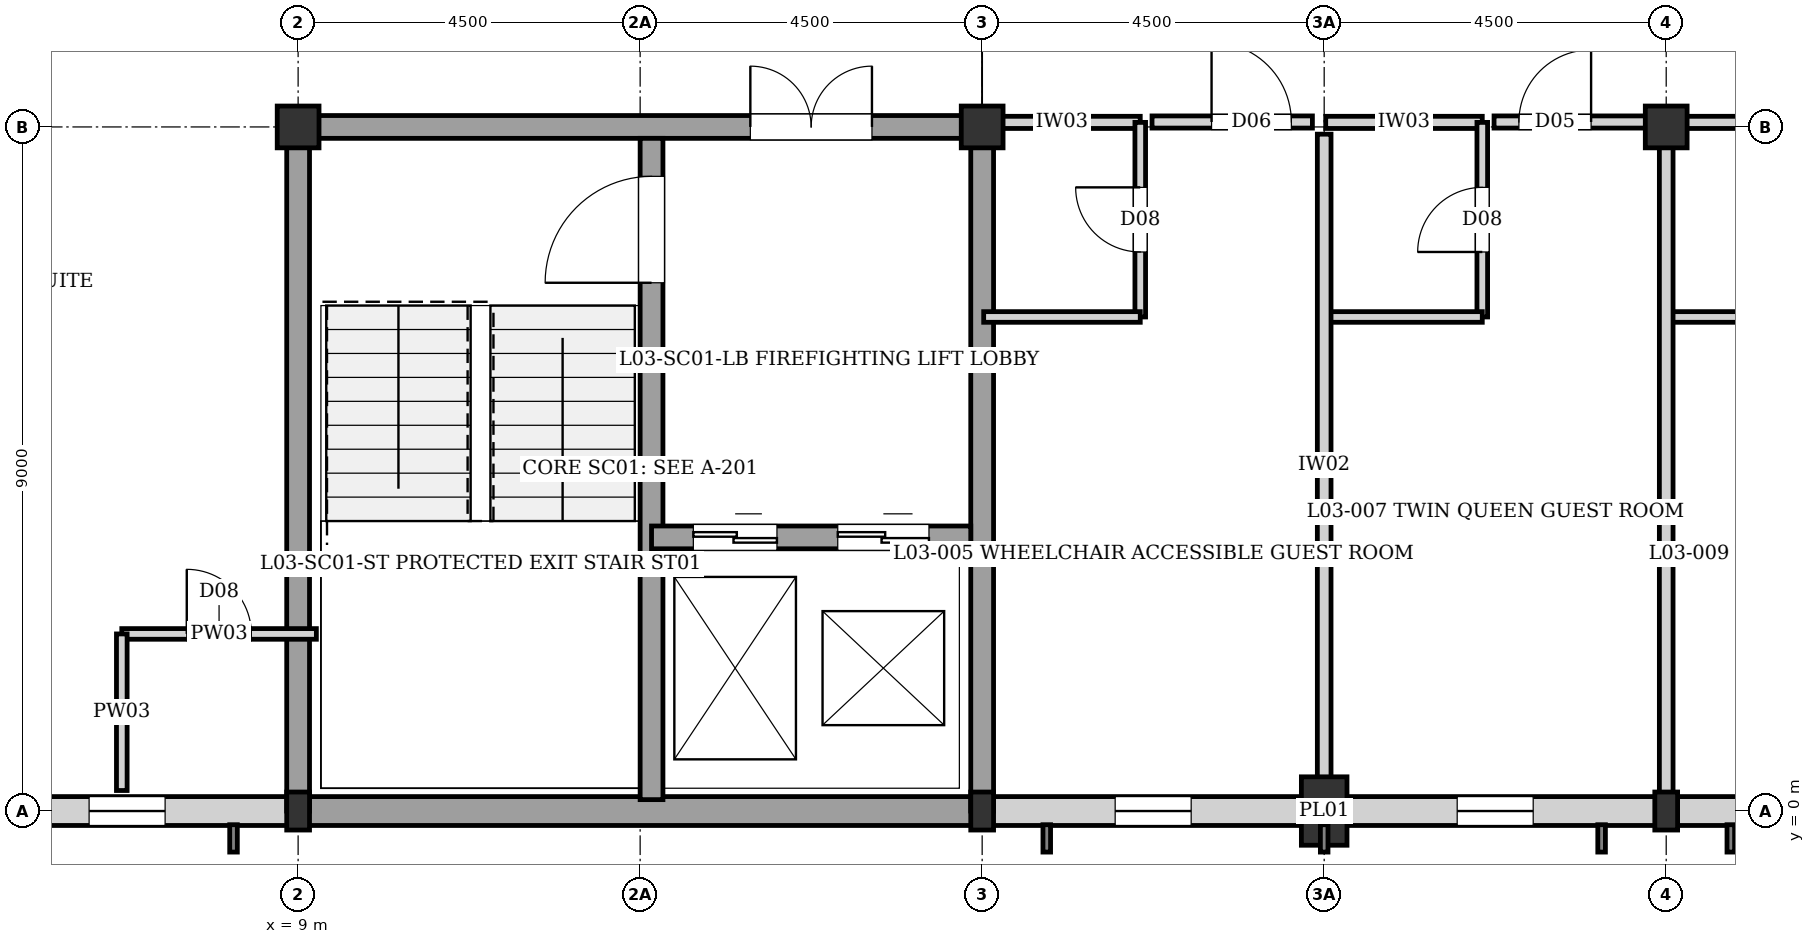
"""IFC4 building model, lengths in metres.
Left out: names, types, materials, properties, quantities, classifications, styles, units other than length and angle.
Written with IfcOpenShell. Run it as: python <this file> out.ifc"""

import sys

from ifc_helpers import new_model, si_unit, direction, frame, frame_2d, origin, origin_2d, place, context, subcontext, project, spatial, rectangle, i_section, extrude, element, fill, save


model = new_model("IFC4")
c1 = context("Model", 3, precision=1e-05, world=origin(), true_north=direction((0.0, 1.0)))
c2 = subcontext(c1, "Body", "Model", "MODEL_VIEW")
j1 = project(units=[si_unit("LENGTHUNIT", "METRE"), si_unit("PLANEANGLEUNIT", "RADIAN")], contexts=[c1])
p1 = place(None, origin())
s1 = spatial("IfcSite", under=j1, at=p1, CompositionType="ELEMENT")
p2 = place(p1, origin())
s2 = spatial("IfcBuilding", under=s1, at=p2, CompositionType="ELEMENT")
p3 = place(p2, frame((0.0, 0.0, 11.52)))
s3 = spatial("IfcBuildingStorey", under=s2, at=p3, CompositionType="ELEMENT", Elevation=11.52)
p4 = place(p3, frame((9.0, 0.0, 0.0), z_axis=(0.0, 0.0, 1.0), x_axis=(1.0, 0.0, 0.0)))
e1 = element("IfcColumn", 1, at=p4, inside=s3, PredefinedType="COLUMN", context=c2, shape_type="SweptSolid", body=[
    extrude(i_section(OverallWidth=0.3, OverallDepth=0.5, WebThickness=0.014, FlangeThickness=0.028, at=origin_2d()), origin(), (0.0, 0.0, 1.0), 3.04),
])
p5 = place(p3, frame((9.0, 9.0, 0.0), z_axis=(0.0, 0.0, 1.0), x_axis=(1.0, 0.0, 0.0)))
e2 = element("IfcColumn", 2, at=p5, inside=s3, PredefinedType="COLUMN", context=c2, shape_type="SweptSolid", body=[
    extrude(rectangle(XDim=0.55, YDim=0.55, at=origin_2d()), origin(), (0.0, 0.0, 1.0), 3.04),
])
p6 = place(p3, frame((18.0, 0.0, 0.0), z_axis=(0.0, 0.0, 1.0), x_axis=(1.0, 0.0, 0.0)))
e3 = element("IfcColumn", 3, at=p6, inside=s3, PredefinedType="COLUMN", context=c2, shape_type="SweptSolid", body=[
    extrude(i_section(OverallWidth=0.3, OverallDepth=0.5, WebThickness=0.014, FlangeThickness=0.028, at=origin_2d()), origin(), (0.0, 0.0, 1.0), 3.04),
])
p7 = place(p3, frame((18.0, 9.0, 0.0), z_axis=(0.0, 0.0, 1.0), x_axis=(1.0, 0.0, 0.0)))
e4 = element("IfcColumn", 4, at=p7, inside=s3, PredefinedType="COLUMN", context=c2, shape_type="SweptSolid", body=[
    extrude(rectangle(XDim=0.55, YDim=0.55, at=origin_2d()), origin(), (0.0, 0.0, 1.0), 3.04),
])
p8 = place(p3, frame((27.0, 0.0, 0.0), z_axis=(0.0, 0.0, 1.0), x_axis=(1.0, 0.0, 0.0)))
e5 = element("IfcColumn", 5, at=p8, inside=s3, PredefinedType="COLUMN", context=c2, shape_type="SweptSolid", body=[
    extrude(i_section(OverallWidth=0.3, OverallDepth=0.5, WebThickness=0.014, FlangeThickness=0.028, at=origin_2d()), origin(), (0.0, 0.0, 1.0), 3.04),
])
p9 = place(p3, frame((27.0, 9.0, 0.0), z_axis=(0.0, 0.0, 1.0), x_axis=(1.0, 0.0, 0.0)))
e6 = element("IfcColumn", 6, at=p9, inside=s3, PredefinedType="COLUMN", context=c2, shape_type="SweptSolid", body=[
    extrude(rectangle(XDim=0.55, YDim=0.55, at=origin_2d()), origin(), (0.0, 0.0, 1.0), 3.04),
])
p10 = place(p3, frame((22.5, 0.0, 0.0), z_axis=(0.0, 0.0, 1.0), x_axis=(1.0, 0.0, 0.0)))
e7 = element("IfcColumn", 7, at=p10, inside=s3, PredefinedType="PILASTER", context=c2, shape_type="SweptSolid", body=[
    extrude(rectangle(XDim=0.6, YDim=0.9, at=origin_2d()), origin(), (0.0, 0.0, 1.0), 3.04),
])
p11 = place(p3, frame((35.87, 0.0, 0.0), z_axis=(0.0, 0.0, 1.0), x_axis=(-1.0, 0.0, 0.0)))
e8 = element("IfcWall", 8, at=p11, inside=s3, PredefinedType="SOLIDWALL", context=c2, shape_type="SweptSolid", body=[
    extrude(rectangle(XDim=8.87, YDim=0.38, at=frame_2d((4.435, 0.0))), origin(), (0.0, 0.0, 1.0), 2.55),
])
p12 = place(p11, frame((1.62, 0.0, 0.35)))
e9 = element("IfcOpeningElement", 9, at=p12, cuts=e8, PredefinedType="OPENING", context=c2, shape_type="SweptSolid", body=[
    extrude(rectangle(XDim=1.0, YDim=1.6, at=frame_2d((0.5, 0.8))), frame((0.0, 0.2, 0.0), z_axis=(0.0, -1.0, 0.0), x_axis=(1.0, 0.0, 0.0)), (0.0, 0.0, 1.0), 0.4),
])
p13 = place(p11, frame((6.12, 0.0, 0.35)))
e10 = element("IfcOpeningElement", 10, at=p13, cuts=e8, PredefinedType="OPENING", context=c2, shape_type="SweptSolid", body=[
    extrude(rectangle(XDim=1.0, YDim=1.6, at=frame_2d((0.5, 0.8))), frame((0.0, 0.2, 0.0), z_axis=(0.0, -1.0, 0.0), x_axis=(1.0, 0.0, 0.0)), (0.0, 0.0, 1.0), 0.4),
])
p14 = place(p3, frame((27.0, 0.0, 0.0), z_axis=(0.0, 0.0, 1.0), x_axis=(-1.0, 0.0, 0.0)))
e11 = element("IfcWall", 11, at=p14, inside=s3, PredefinedType="SOLIDWALL", context=c2, shape_type="SweptSolid", body=[
    extrude(rectangle(XDim=8.87, YDim=0.38, at=frame_2d((4.435, 0.0))), origin(), (0.0, 0.0, 1.0), 2.38),
])
p15 = place(p14, frame((1.75, 0.0, 0.35)))
e12 = element("IfcOpeningElement", 12, at=p15, cuts=e11, PredefinedType="OPENING", context=c2, shape_type="SweptSolid", body=[
    extrude(rectangle(XDim=1.0, YDim=1.6, at=frame_2d((0.5, 0.8))), frame((0.0, 0.2, 0.0), z_axis=(0.0, -1.0, 0.0), x_axis=(1.0, 0.0, 0.0)), (0.0, 0.0, 1.0), 0.4),
])
p16 = place(p14, frame((6.25, 0.0, 0.35)))
e13 = element("IfcOpeningElement", 13, at=p16, cuts=e11, PredefinedType="OPENING", context=c2, shape_type="SweptSolid", body=[
    extrude(rectangle(XDim=1.0, YDim=1.6, at=frame_2d((0.5, 0.8))), frame((0.0, 0.2, 0.0), z_axis=(0.0, -1.0, 0.0), x_axis=(1.0, 0.0, 0.0)), (0.0, 0.0, 1.0), 0.4),
])
p17 = place(p3, frame((18.0, 0.0, 0.0), z_axis=(0.0, 0.0, 1.0), x_axis=(-1.0, 0.0, 0.0)))
e14 = element("IfcWall", 14, at=p17, inside=s3, PredefinedType="SOLIDWALL", context=c2, shape_type="SweptSolid", body=[
    extrude(rectangle(XDim=9.0, YDim=0.38, at=frame_2d((4.5, 0.0))), origin(), (0.0, 0.0, 1.0), 2.82),
])
p18 = place(p3, frame((8.87, 0.0, 0.0), z_axis=(0.0, 0.0, 1.0), x_axis=(-1.0, 0.0, 0.0)))
e15 = element("IfcWall", 15, at=p18, inside=s3, PredefinedType="SOLIDWALL", context=c2, shape_type="SweptSolid", body=[
    extrude(rectangle(XDim=8.87, YDim=0.38, at=frame_2d((4.435, 0.0))), origin(), (0.0, 0.0, 1.0), 2.48),
])
p19 = place(p18, frame((1.62, 0.0, 0.35)))
e16 = element("IfcOpeningElement", 16, at=p19, cuts=e15, PredefinedType="OPENING", context=c2, shape_type="SweptSolid", body=[
    extrude(rectangle(XDim=1.0, YDim=1.6, at=frame_2d((0.5, 0.8))), frame((0.0, 0.2, 0.0), z_axis=(0.0, -1.0, 0.0), x_axis=(1.0, 0.0, 0.0)), (0.0, 0.0, 1.0), 0.4),
])
p20 = place(p18, frame((6.12, 0.0, 0.35)))
e17 = element("IfcOpeningElement", 17, at=p20, cuts=e15, PredefinedType="OPENING", context=c2, shape_type="SweptSolid", body=[
    extrude(rectangle(XDim=1.0, YDim=1.6, at=frame_2d((0.5, 0.8))), frame((0.0, 0.2, 0.0), z_axis=(0.0, -1.0, 0.0), x_axis=(1.0, 0.0, 0.0)), (0.0, 0.0, 1.0), 0.4),
])
p21 = place(p3, frame((18.0, 0.0, 0.0), z_axis=(0.0, 0.0, 1.0), x_axis=(0.0, 1.0, 0.0)))
e18 = element("IfcWall", 18, at=p21, inside=s3, PredefinedType="SHEAR", context=c2, shape_type="SweptSolid", body=[
    extrude(rectangle(XDim=9.0, YDim=0.3, at=frame_2d((4.5, 0.0))), origin(), (0.0, 0.0, 1.0), 2.82),
])
p22 = place(p3, frame((9.0, 9.0, 0.0), z_axis=(0.0, 0.0, 1.0), x_axis=(1.0, 0.0, 0.0)))
e19 = element("IfcWall", 19, at=p22, inside=s3, PredefinedType="SHEAR", context=c2, shape_type="SweptSolid", body=[
    extrude(rectangle(XDim=9.0, YDim=0.3, at=frame_2d((4.5, 0.0))), origin(), (0.0, 0.0, 1.0), 2.82),
])
p23 = place(p22, frame((5.95, 0.0, 0.0)))
e20 = element("IfcOpeningElement", 20, at=p23, cuts=e19, PredefinedType="OPENING", context=c2, shape_type="SweptSolid", body=[
    extrude(rectangle(XDim=1.6, YDim=2.1, at=frame_2d((0.8, 1.05))), frame((0.0, 0.16, 0.0), z_axis=(0.0, -1.0, 0.0), x_axis=(1.0, 0.0, 0.0)), (0.0, 0.0, 1.0), 0.32),
])
p24 = place(p3, frame((9.0, 0.0, 0.0), z_axis=(0.0, 0.0, 1.0), x_axis=(0.0, 1.0, 0.0)))
e21 = element("IfcWall", 21, at=p24, inside=s3, PredefinedType="SHEAR", context=c2, shape_type="SweptSolid", body=[
    extrude(rectangle(XDim=9.0, YDim=0.3, at=frame_2d((4.5, 0.0))), origin(), (0.0, 0.0, 1.0), 2.82),
])
p25 = place(p3, frame((13.65, 0.15, 0.0), z_axis=(0.0, 0.0, 1.0), x_axis=(0.0, 1.0, 0.0)))
e22 = element("IfcWall", 22, at=p25, inside=s3, PredefinedType="SHEAR", context=c2, shape_type="SweptSolid", body=[
    extrude(rectangle(XDim=8.7, YDim=0.3, at=frame_2d((4.35, 0.0))), origin(), (0.0, 0.0, 1.0), 2.82),
])
p26 = place(p25, frame((6.8, 0.0, 0.0)))
e23 = element("IfcOpeningElement", 23, at=p26, cuts=e22, PredefinedType="OPENING", context=c2, shape_type="SweptSolid", body=[
    extrude(rectangle(XDim=1.4, YDim=2.02, at=frame_2d((0.7, 1.01))), frame((0.0, 0.16, 0.0), z_axis=(0.0, -1.0, 0.0), x_axis=(1.0, 0.0, 0.0)), (0.0, 0.0, 1.0), 0.32),
])
p27 = place(p3, frame((13.65, 3.6, 0.0), z_axis=(0.0, 0.0, 1.0), x_axis=(1.0, 0.0, 0.0)))
e24 = element("IfcWall", 24, at=p27, inside=s3, PredefinedType="SHEAR", context=c2, shape_type="SweptSolid", body=[
    extrude(rectangle(XDim=4.2, YDim=0.3, at=frame_2d((2.1, 0.0))), origin(), (0.0, 0.0, 1.0), 2.82),
])
p28 = place(p27, frame((0.55, 0.0, 0.0)))
e25 = element("IfcOpeningElement", 25, at=p28, cuts=e24, PredefinedType="OPENING", context=c2, shape_type="SweptSolid", body=[
    extrude(rectangle(XDim=1.1, YDim=2.1, at=frame_2d((0.55, 1.05))), frame((0.0, 0.16, 0.0), z_axis=(0.0, -1.0, 0.0), x_axis=(1.0, 0.0, 0.0)), (0.0, 0.0, 1.0), 0.32),
])
p29 = place(p27, frame((2.45, 0.0, 0.0)))
e26 = element("IfcOpeningElement", 26, at=p29, cuts=e24, PredefinedType="OPENING", context=c2, shape_type="SweptSolid", body=[
    extrude(rectangle(XDim=1.2, YDim=2.2, at=frame_2d((0.6, 1.1))), frame((0.0, 0.16, 0.0), z_axis=(0.0, -1.0, 0.0), x_axis=(1.0, 0.0, 0.0)), (0.0, 0.0, 1.0), 0.32),
])
p30 = place(p3, frame((6.68, 2.33, 0.0), z_axis=(0.0, 0.0, 1.0), x_axis=(1.0, 0.0, 0.0)))
e27 = element("IfcWall", 27, at=p30, inside=s3, PredefinedType="PLUMBINGWALL", context=c2, shape_type="SweptSolid", body=[
    extrude(rectangle(XDim=2.56, YDim=0.14, at=frame_2d((1.28, 0.0))), origin(), (0.0, 0.0, 1.0), 2.82),
])
p31 = place(p30, frame((0.855, 0.0, 0.0)))
e28 = element("IfcOpeningElement", 28, at=p31, cuts=e27, PredefinedType="OPENING", context=c2, shape_type="SweptSolid", body=[
    extrude(rectangle(XDim=0.85, YDim=2.04, at=frame_2d((0.425, 1.02))), frame((0.0, 0.08, 0.0), z_axis=(0.0, -1.0, 0.0), x_axis=(1.0, 0.0, 0.0)), (0.0, 0.0, 1.0), 0.16),
])
p32 = place(p3, frame((6.68, 0.27, 0.0), z_axis=(0.0, 0.0, 1.0), x_axis=(0.0, 1.0, 0.0)))
e29 = element("IfcWall", 29, at=p32, inside=s3, PredefinedType="PLUMBINGWALL", context=c2, shape_type="SweptSolid", body=[
    extrude(rectangle(XDim=2.06, YDim=0.14, at=frame_2d((1.03, 0.0))), origin(), (0.0, 0.0, 1.0), 2.82),
])
p33 = place(p3, frame((18.02, 9.06, 0.0), z_axis=(0.0, 0.0, 1.0), x_axis=(1.0, 0.0, 0.0)))
e30 = element("IfcWall", 30, at=p33, inside=s3, PredefinedType="PARTITIONING", context=c2, shape_type="SweptSolid", body=[
    extrude(rectangle(XDim=2.06, YDim=0.16, at=frame_2d((1.03, 0.0))), origin(), (0.0, 0.0, 1.0), 2.45),
])
p34 = place(p3, frame((20.08, 6.5, 0.0), z_axis=(0.0, 0.0, 1.0), x_axis=(0.0, 1.0, 0.0)))
e31 = element("IfcWall", 31, at=p34, inside=s3, PredefinedType="PLUMBINGWALL", context=c2, shape_type="SweptSolid", body=[
    extrude(rectangle(XDim=2.56, YDim=0.14, at=frame_2d((1.28, 0.0))), origin(), (0.0, 0.0, 1.0), 2.82),
])
p35 = place(p34, frame((0.855, 0.0, 0.0)))
e32 = element("IfcOpeningElement", 32, at=p35, cuts=e31, PredefinedType="OPENING", context=c2, shape_type="SweptSolid", body=[
    extrude(rectangle(XDim=0.85, YDim=2.04, at=frame_2d((0.425, 1.02))), frame((0.0, 0.08, 0.0), z_axis=(0.0, -1.0, 0.0), x_axis=(1.0, 0.0, 0.0)), (0.0, 0.0, 1.0), 0.16),
])
p36 = place(p3, frame((18.02, 6.5, 0.0), z_axis=(0.0, 0.0, 1.0), x_axis=(1.0, 0.0, 0.0)))
e33 = element("IfcWall", 33, at=p36, inside=s3, PredefinedType="PLUMBINGWALL", context=c2, shape_type="SweptSolid", body=[
    extrude(rectangle(XDim=2.06, YDim=0.14, at=frame_2d((1.03, 0.0))), origin(), (0.0, 0.0, 1.0), 2.82),
])
p37 = place(p3, frame((22.52, 9.06, 0.0), z_axis=(0.0, 0.0, 1.0), x_axis=(1.0, 0.0, 0.0)))
e34 = element("IfcWall", 34, at=p37, inside=s3, PredefinedType="PARTITIONING", context=c2, shape_type="SweptSolid", body=[
    extrude(rectangle(XDim=2.06, YDim=0.16, at=frame_2d((1.03, 0.0))), origin(), (0.0, 0.0, 1.0), 2.45),
])
p38 = place(p3, frame((24.58, 6.5, 0.0), z_axis=(0.0, 0.0, 1.0), x_axis=(0.0, 1.0, 0.0)))
e35 = element("IfcWall", 35, at=p38, inside=s3, PredefinedType="PLUMBINGWALL", context=c2, shape_type="SweptSolid", body=[
    extrude(rectangle(XDim=2.56, YDim=0.14, at=frame_2d((1.28, 0.0))), origin(), (0.0, 0.0, 1.0), 2.82),
])
p39 = place(p38, frame((0.855, 0.0, 0.0)))
e36 = element("IfcOpeningElement", 36, at=p39, cuts=e35, PredefinedType="OPENING", context=c2, shape_type="SweptSolid", body=[
    extrude(rectangle(XDim=0.85, YDim=2.04, at=frame_2d((0.425, 1.02))), frame((0.0, 0.08, 0.0), z_axis=(0.0, -1.0, 0.0), x_axis=(1.0, 0.0, 0.0)), (0.0, 0.0, 1.0), 0.16),
])
p40 = place(p3, frame((22.52, 6.5, 0.0), z_axis=(0.0, 0.0, 1.0), x_axis=(1.0, 0.0, 0.0)))
e37 = element("IfcWall", 37, at=p40, inside=s3, PredefinedType="PLUMBINGWALL", context=c2, shape_type="SweptSolid", body=[
    extrude(rectangle(XDim=2.06, YDim=0.14, at=frame_2d((1.03, 0.0))), origin(), (0.0, 0.0, 1.0), 2.82),
])
p41 = place(p3, frame((27.02, 9.06, 0.0), z_axis=(0.0, 0.0, 1.0), x_axis=(1.0, 0.0, 0.0)))
e38 = element("IfcWall", 38, at=p41, inside=s3, PredefinedType="PARTITIONING", context=c2, shape_type="SweptSolid", body=[
    extrude(rectangle(XDim=2.06, YDim=0.16, at=frame_2d((1.03, 0.0))), origin(), (0.0, 0.0, 1.0), 2.39),
])
p42 = place(p3, frame((27.02, 6.5, 0.0), z_axis=(0.0, 0.0, 1.0), x_axis=(1.0, 0.0, 0.0)))
e39 = element("IfcWall", 39, at=p42, inside=s3, PredefinedType="PLUMBINGWALL", context=c2, shape_type="SweptSolid", body=[
    extrude(rectangle(XDim=2.06, YDim=0.14, at=frame_2d((1.03, 0.0))), origin(), (0.0, 0.0, 1.0), 2.82),
])
p43 = place(p3, frame((22.5, 0.195, 0.0), z_axis=(0.0, 0.0, 1.0), x_axis=(0.0, 1.0, 0.0)))
e40 = element("IfcWall", 40, at=p43, inside=s3, PredefinedType="PARTITIONING", context=c2, shape_type="SweptSolid", body=[
    extrude(rectangle(XDim=8.71, YDim=0.18, at=frame_2d((4.355, 0.0))), origin(), (0.0, 0.0, 1.0), 2.82),
])
p44 = place(p3, frame((27.0, 0.195, 0.0), z_axis=(0.0, 0.0, 1.0), x_axis=(0.0, 1.0, 0.0)))
e41 = element("IfcWall", 41, at=p44, inside=s3, PredefinedType="PARTITIONING", context=c2, shape_type="SweptSolid", body=[
    extrude(rectangle(XDim=8.71, YDim=0.18, at=frame_2d((4.355, 0.0))), origin(), (0.0, 0.0, 1.0), 2.45),
])
p45 = place(p3, frame((20.235, 9.065, 0.0), z_axis=(0.0, 0.0, 1.0), x_axis=(1.0, 0.0, 0.0)))
e42 = element("IfcWall", 42, at=p45, inside=s3, PredefinedType="PARTITIONING", context=c2, shape_type="SweptSolid", body=[
    extrude(rectangle(XDim=2.11, YDim=0.16, at=frame_2d((1.055, 0.0))), origin(), (0.0, 0.0, 1.0), 2.45),
])
p46 = place(p45, frame((0.783, 0.0, 0.0)))
e43 = element("IfcOpeningElement", 43, at=p46, cuts=e42, PredefinedType="OPENING", context=c2, shape_type="SweptSolid", body=[
    extrude(rectangle(XDim=1.05, YDim=2.15, at=frame_2d((0.525, 1.075))), frame((0.0, 0.09, 0.0), z_axis=(0.0, -1.0, 0.0), x_axis=(1.0, 0.0, 0.0)), (0.0, 0.0, 1.0), 0.18),
])
p47 = place(p3, frame((24.735, 9.065, 0.0), z_axis=(0.0, 0.0, 1.0), x_axis=(1.0, 0.0, 0.0)))
e44 = element("IfcWall", 44, at=p47, inside=s3, PredefinedType="PARTITIONING", context=c2, shape_type="SweptSolid", body=[
    extrude(rectangle(XDim=2.11, YDim=0.16, at=frame_2d((1.055, 0.0))), origin(), (0.0, 0.0, 1.0), 2.45),
])
p48 = place(p47, frame((0.327, 0.0, 0.0)))
e45 = element("IfcOpeningElement", 45, at=p48, cuts=e44, PredefinedType="OPENING", context=c2, shape_type="SweptSolid", body=[
    extrude(rectangle(XDim=0.95, YDim=2.15, at=frame_2d((0.475, 1.075))), frame((0.0, 0.09, 0.0), z_axis=(0.0, -1.0, 0.0), x_axis=(1.0, 0.0, 0.0)), (0.0, 0.0, 1.0), 0.18),
])
p49 = place(p15, origin())
e46 = element("IfcWindow", 46, at=p49, inside=s3, PartitioningType="SINGLE_PANEL", PredefinedType="WINDOW", context=c2, shape_type="SweptSolid", body=[
    extrude(rectangle(XDim=1.0, YDim=1.6, at=frame_2d((0.5, 0.8))), frame((0.0, 0.03, 0.0), z_axis=(0.0, -1.0, 0.0), x_axis=(1.0, 0.0, 0.0)), (0.0, 0.0, 1.0), 0.06),
])
fill(e12, e46)
p50 = place(p16, origin())
e47 = element("IfcWindow", 47, at=p50, inside=s3, PartitioningType="SINGLE_PANEL", PredefinedType="WINDOW", context=c2, shape_type="SweptSolid", body=[
    extrude(rectangle(XDim=1.0, YDim=1.6, at=frame_2d((0.5, 0.8))), frame((0.0, 0.03, 0.0), z_axis=(0.0, -1.0, 0.0), x_axis=(1.0, 0.0, 0.0)), (0.0, 0.0, 1.0), 0.06),
])
fill(e13, e47)
p51 = place(p19, origin())
e48 = element("IfcWindow", 48, at=p51, inside=s3, PartitioningType="SINGLE_PANEL", PredefinedType="WINDOW", context=c2, shape_type="SweptSolid", body=[
    extrude(rectangle(XDim=1.0, YDim=1.6, at=frame_2d((0.5, 0.8))), frame((0.0, 0.03, 0.0), z_axis=(0.0, -1.0, 0.0), x_axis=(1.0, 0.0, 0.0)), (0.0, 0.0, 1.0), 0.06),
])
fill(e16, e48)
p52 = place(p23, origin())
e49 = element("IfcDoor", 49, at=p52, inside=s3, OperationType="DOUBLE_DOOR_SINGLE_SWING", PredefinedType="DOOR", context=c2, shape_type="SweptSolid", body=[
    extrude(rectangle(XDim=1.6, YDim=2.1, at=frame_2d((0.8, 1.05))), frame((0.0, 0.025, 0.0), z_axis=(0.0, -1.0, 0.0), x_axis=(1.0, 0.0, 0.0)), (0.0, 0.0, 1.0), 0.05),
])
fill(e20, e49)
p53 = place(p26, origin())
e50 = element("IfcDoor", 50, at=p53, inside=s3, OperationType="SINGLE_SWING_LEFT", PredefinedType="DOOR", context=c2, shape_type="SweptSolid", body=[
    extrude(rectangle(XDim=1.4, YDim=2.02, at=frame_2d((0.7, 1.01))), frame((0.0, 0.025, 0.0), z_axis=(0.0, -1.0, 0.0), x_axis=(1.0, 0.0, 0.0)), (0.0, 0.0, 1.0), 0.05),
])
fill(e23, e50)
p54 = place(p28, origin())
e51 = element("IfcDoor", 51, at=p54, inside=s3, OperationType="DOUBLE_DOOR_SLIDING", PredefinedType="DOOR", context=c2, shape_type="SweptSolid", body=[
    extrude(rectangle(XDim=1.1, YDim=2.1, at=frame_2d((0.55, 1.05))), frame((0.0, 0.025, 0.0), z_axis=(0.0, -1.0, 0.0), x_axis=(1.0, 0.0, 0.0)), (0.0, 0.0, 1.0), 0.05),
])
fill(e25, e51)
p55 = place(p29, origin())
e52 = element("IfcDoor", 52, at=p55, inside=s3, OperationType="DOUBLE_DOOR_SLIDING", PredefinedType="DOOR", context=c2, shape_type="SweptSolid", body=[
    extrude(rectangle(XDim=1.2, YDim=2.2, at=frame_2d((0.6, 1.1))), frame((0.0, 0.025, 0.0), z_axis=(0.0, -1.0, 0.0), x_axis=(1.0, 0.0, 0.0)), (0.0, 0.0, 1.0), 0.05),
])
fill(e26, e52)
p56 = place(p31, origin())
e53 = element("IfcDoor", 53, at=p56, inside=s3, OperationType="SINGLE_SWING_LEFT", PredefinedType="DOOR", context=c2, shape_type="SweptSolid", body=[
    extrude(rectangle(XDim=0.85, YDim=2.04, at=frame_2d((0.425, 1.02))), frame((0.0, 0.025, 0.0), z_axis=(0.0, -1.0, 0.0), x_axis=(1.0, 0.0, 0.0)), (0.0, 0.0, 1.0), 0.05),
])
fill(e28, e53)
p57 = place(p35, origin())
e54 = element("IfcDoor", 54, at=p57, inside=s3, OperationType="SINGLE_SWING_RIGHT", PredefinedType="DOOR", context=c2, shape_type="SweptSolid", body=[
    extrude(rectangle(XDim=0.85, YDim=2.04, at=frame_2d((0.425, 1.02))), frame((0.0, 0.025, 0.0), z_axis=(0.0, -1.0, 0.0), x_axis=(1.0, 0.0, 0.0)), (0.0, 0.0, 1.0), 0.05),
])
fill(e32, e54)
p58 = place(p39, origin())
e55 = element("IfcDoor", 55, at=p58, inside=s3, OperationType="SINGLE_SWING_LEFT", PredefinedType="DOOR", context=c2, shape_type="SweptSolid", body=[
    extrude(rectangle(XDim=0.85, YDim=2.04, at=frame_2d((0.425, 1.02))), frame((0.0, 0.025, 0.0), z_axis=(0.0, -1.0, 0.0), x_axis=(1.0, 0.0, 0.0)), (0.0, 0.0, 1.0), 0.05),
])
fill(e36, e55)
p59 = place(p46, origin())
e56 = element("IfcDoor", 56, at=p59, inside=s3, OperationType="SINGLE_SWING_LEFT", PredefinedType="DOOR", context=c2, shape_type="SweptSolid", body=[
    extrude(rectangle(XDim=1.05, YDim=2.15, at=frame_2d((0.525, 1.075))), frame((0.0, 0.025, 0.0), z_axis=(0.0, -1.0, 0.0), x_axis=(1.0, 0.0, 0.0)), (0.0, 0.0, 1.0), 0.05),
])
fill(e43, e56)
p60 = place(p48, origin())
e57 = element("IfcDoor", 57, at=p60, inside=s3, OperationType="SINGLE_SWING_RIGHT", PredefinedType="DOOR", context=c2, shape_type="SweptSolid", body=[
    extrude(rectangle(XDim=0.95, YDim=2.15, at=frame_2d((0.475, 1.075))), frame((0.0, 0.025, 0.0), z_axis=(0.0, -1.0, 0.0), x_axis=(1.0, 0.0, 0.0)), (0.0, 0.0, 1.0), 0.05),
])
fill(e45, e57)
save(model, sys.argv[1])
